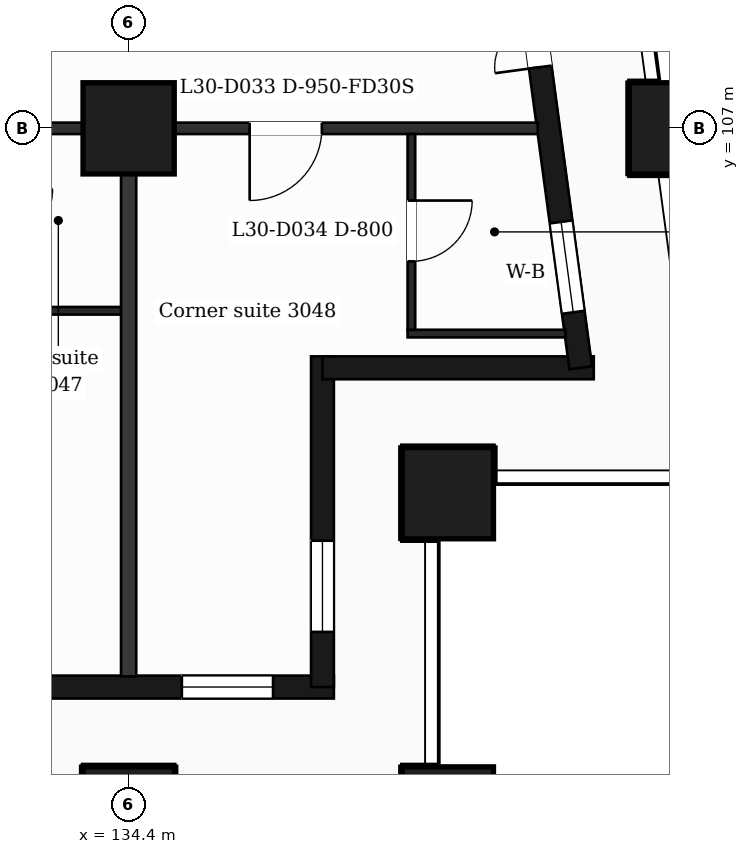
"""IFC4 building model, lengths in metres.
Left out: names, types, materials, properties, quantities, classifications, styles, units other than length and angle.
Written with IfcOpenShell. Run it as: python <this file> out.ifc"""

import sys

from ifc_helpers import new_model, si_unit, direction, frame, frame_2d, origin, origin_2d, place, context, subcontext, project, spatial, rectangle, extrude, element, fill, save


model = new_model("IFC4")
c1 = context("Model", 3, precision=1e-05, world=origin(), true_north=direction((0.0, 1.0)))
c2 = subcontext(c1, "Body", "Model", "MODEL_VIEW")
j1 = project(units=[si_unit("LENGTHUNIT", "METRE"), si_unit("PLANEANGLEUNIT", "RADIAN")], contexts=[c1])
p1 = place(None, origin())
s1 = spatial("IfcSite", under=j1, at=p1, CompositionType="ELEMENT")
p2 = place(p1, origin())
s2 = spatial("IfcBuilding", under=s1, at=p2, CompositionType="ELEMENT")
p3 = place(p2, frame((0.0, 0.0, 128.0)))
s3 = spatial("IfcBuildingStorey", under=s2, at=p3, CompositionType="ELEMENT", Elevation=128.0)
for number, where, z_axis, x_axis in (
    (1, (134.4, 98.0, 0.0), (0.0, 0.0, 1.0), (1.0, 0.0, 0.0)),
    (2, (138.6, 98.0, 0.0), (0.0, 0.0, 1.0), (1.0, 0.0, 0.0)),
    (3, (138.6, 102.2, 0.0), (0.0, 0.0, 1.0), (1.0, 0.0, 0.0)),
    (4, (134.4, 107.0, 0.0), (0.0, 0.0, 1.0), (1.0, 0.0, 0.0)),
    (5, (141.588, 107.0, 0.0), (0.0, 0.0, 1.0), (1.0, 0.0, 0.0)),
):
    element("IfcColumn", number, at=place(p3, frame(where, z_axis=z_axis, x_axis=x_axis)), inside=s3, PredefinedType="COLUMN", context=c2, shape_type="SweptSolid", body=[
        extrude(rectangle(XDim=1.2, YDim=1.2, at=origin_2d()), origin(), (0.0, 0.0, 1.0), 3.7),
    ])
p4 = place(p3, frame((89.85, 99.65, 0.0), z_axis=(0.0, 0.0, 1.0), x_axis=(1.0, 0.0, 0.0)))
e6 = element("IfcWall", 6, at=p4, inside=s3, PredefinedType="SOLIDWALL", context=c2, shape_type="SweptSolid", body=[
    extrude(rectangle(XDim=47.25, YDim=0.3, at=frame_2d((23.625, 0.0))), origin(), (0.0, 0.0, 1.0), 3.38),
])
p5 = place(p4, frame((0.725, 0.0, 0.9)))
e7 = element("IfcOpeningElement", 7, at=p5, cuts=e6, PredefinedType="OPENING", context=c2, shape_type="SweptSolid", body=[
    extrude(rectangle(XDim=1.2, YDim=2.1, at=frame_2d((0.6, 1.05))), frame((0.0, 0.16, 0.0), z_axis=(0.0, -1.0, 0.0), x_axis=(1.0, 0.0, 0.0)), (0.0, 0.0, 1.0), 0.32),
])
p6 = place(p4, frame((3.45, 0.0, 0.9)))
e8 = element("IfcOpeningElement", 8, at=p6, cuts=e6, PredefinedType="OPENING", context=c2, shape_type="SweptSolid", body=[
    extrude(rectangle(XDim=2.4, YDim=2.1, at=frame_2d((1.2, 1.05))), frame((0.0, 0.16, 0.0), z_axis=(0.0, -1.0, 0.0), x_axis=(1.0, 0.0, 0.0)), (0.0, 0.0, 1.0), 0.32),
])
p7 = place(p4, frame((8.25, 0.0, 0.9)))
e9 = element("IfcOpeningElement", 9, at=p7, cuts=e6, PredefinedType="OPENING", context=c2, shape_type="SweptSolid", body=[
    extrude(rectangle(XDim=1.2, YDim=2.1, at=frame_2d((0.6, 1.05))), frame((0.0, 0.16, 0.0), z_axis=(0.0, -1.0, 0.0), x_axis=(1.0, 0.0, 0.0)), (0.0, 0.0, 1.0), 0.32),
])
p8 = place(p4, frame((12.45, 0.0, 0.9)))
e10 = element("IfcOpeningElement", 10, at=p8, cuts=e6, PredefinedType="OPENING", context=c2, shape_type="SweptSolid", body=[
    extrude(rectangle(XDim=1.2, YDim=2.1, at=frame_2d((0.6, 1.05))), frame((0.0, 0.16, 0.0), z_axis=(0.0, -1.0, 0.0), x_axis=(1.0, 0.0, 0.0)), (0.0, 0.0, 1.0), 0.32),
])
p9 = place(p4, frame((16.05, 0.0, 0.9)))
e11 = element("IfcOpeningElement", 11, at=p9, cuts=e6, PredefinedType="OPENING", context=c2, shape_type="SweptSolid", body=[
    extrude(rectangle(XDim=2.4, YDim=2.1, at=frame_2d((1.2, 1.05))), frame((0.0, 0.16, 0.0), z_axis=(0.0, -1.0, 0.0), x_axis=(1.0, 0.0, 0.0)), (0.0, 0.0, 1.0), 0.32),
])
p10 = place(p4, frame((20.25, 0.0, 0.9)))
e12 = element("IfcOpeningElement", 12, at=p10, cuts=e6, PredefinedType="OPENING", context=c2, shape_type="SweptSolid", body=[
    extrude(rectangle(XDim=2.4, YDim=2.1, at=frame_2d((1.2, 1.05))), frame((0.0, 0.16, 0.0), z_axis=(0.0, -1.0, 0.0), x_axis=(1.0, 0.0, 0.0)), (0.0, 0.0, 1.0), 0.32),
])
p11 = place(p4, frame((25.05, 0.0, 0.0)))
e13 = element("IfcOpeningElement", 13, at=p11, cuts=e6, PredefinedType="OPENING", context=c2, shape_type="SweptSolid", body=[
    extrude(rectangle(XDim=1.2, YDim=2.4, at=frame_2d((0.6, 1.2))), frame((0.0, 0.16, 0.0), z_axis=(0.0, -1.0, 0.0), x_axis=(1.0, 0.0, 0.0)), (0.0, 0.0, 1.0), 0.32),
])
p12 = place(p4, frame((28.65, 0.0, 0.9)))
e14 = element("IfcOpeningElement", 14, at=p12, cuts=e6, PredefinedType="OPENING", context=c2, shape_type="SweptSolid", body=[
    extrude(rectangle(XDim=2.4, YDim=2.1, at=frame_2d((1.2, 1.05))), frame((0.0, 0.16, 0.0), z_axis=(0.0, -1.0, 0.0), x_axis=(1.0, 0.0, 0.0)), (0.0, 0.0, 1.0), 0.32),
])
p13 = place(p4, frame((32.85, 0.0, 0.9)))
e15 = element("IfcOpeningElement", 15, at=p13, cuts=e6, PredefinedType="OPENING", context=c2, shape_type="SweptSolid", body=[
    extrude(rectangle(XDim=2.4, YDim=2.1, at=frame_2d((1.2, 1.05))), frame((0.0, 0.16, 0.0), z_axis=(0.0, -1.0, 0.0), x_axis=(1.0, 0.0, 0.0)), (0.0, 0.0, 1.0), 0.32),
])
p14 = place(p4, frame((37.65, 0.0, 0.9)))
e16 = element("IfcOpeningElement", 16, at=p14, cuts=e6, PredefinedType="OPENING", context=c2, shape_type="SweptSolid", body=[
    extrude(rectangle(XDim=1.2, YDim=2.1, at=frame_2d((0.6, 1.05))), frame((0.0, 0.16, 0.0), z_axis=(0.0, -1.0, 0.0), x_axis=(1.0, 0.0, 0.0)), (0.0, 0.0, 1.0), 0.32),
])
p15 = place(p4, frame((41.85, 0.0, 0.9)))
e17 = element("IfcOpeningElement", 17, at=p15, cuts=e6, PredefinedType="OPENING", context=c2, shape_type="SweptSolid", body=[
    extrude(rectangle(XDim=1.2, YDim=2.1, at=frame_2d((0.6, 1.05))), frame((0.0, 0.16, 0.0), z_axis=(0.0, -1.0, 0.0), x_axis=(1.0, 0.0, 0.0)), (0.0, 0.0, 1.0), 0.32),
])
p16 = place(p4, frame((45.25, 0.0, 0.9)))
e18 = element("IfcOpeningElement", 18, at=p16, cuts=e6, PredefinedType="OPENING", context=c2, shape_type="SweptSolid", body=[
    extrude(rectangle(XDim=1.2, YDim=2.1, at=frame_2d((0.6, 1.05))), frame((0.0, 0.16, 0.0), z_axis=(0.0, -1.0, 0.0), x_axis=(1.0, 0.0, 0.0)), (0.0, 0.0, 1.0), 0.32),
])
p17 = place(p3, frame((136.95, 99.65, 0.0), z_axis=(0.0, 0.0, 1.0), x_axis=(0.0, 1.0, 0.0)))
e19 = element("IfcWall", 19, at=p17, inside=s3, PredefinedType="SOLIDWALL", context=c2, shape_type="SweptSolid", body=[
    extrude(rectangle(XDim=4.35, YDim=0.3, at=frame_2d((2.175, 0.0))), origin(), (0.0, 0.0, 1.0), 3.38),
])
p18 = place(p17, frame((0.725, 0.0, 0.9)))
e20 = element("IfcOpeningElement", 20, at=p18, cuts=e19, PredefinedType="OPENING", context=c2, shape_type="SweptSolid", body=[
    extrude(rectangle(XDim=1.2, YDim=2.1, at=frame_2d((0.6, 1.05))), frame((0.0, 0.16, 0.0), z_axis=(0.0, -1.0, 0.0), x_axis=(1.0, 0.0, 0.0)), (0.0, 0.0, 1.0), 0.32),
])
p19 = place(p3, frame((136.95, 103.85, 0.0), z_axis=(0.0, 0.0, 1.0), x_axis=(1.0, 0.0, 0.0)))
e21 = element("IfcWall", 21, at=p19, inside=s3, PredefinedType="SOLIDWALL", context=c2, shape_type="SweptSolid", body=[
    extrude(rectangle(XDim=3.569, YDim=0.3, at=frame_2d((1.785, 0.0))), origin(), (0.0, 0.0, 1.0), 3.38),
])
p20 = place(p3, frame((140.348, 103.85, 0.0), z_axis=(0.0, 0.0, 1.0), x_axis=(-0.133431549479, 0.991058031401, 0.0)))
e22 = element("IfcWall", 22, at=p20, inside=s3, PredefinedType="SOLIDWALL", context=c2, shape_type="SweptSolid", body=[
    extrude(rectangle(XDim=6.609, YDim=0.3, at=frame_2d((3.304, 0.0))), origin(), (0.0, 0.0, 1.0), 3.38),
])
p21 = place(p20, frame((0.737, 0.0, 0.9)))
e23 = element("IfcOpeningElement", 23, at=p21, cuts=e22, PredefinedType="OPENING", context=c2, shape_type="SweptSolid", body=[
    extrude(rectangle(XDim=1.2, YDim=2.1, at=frame_2d((0.6, 1.05))), frame((0.0, 0.16, 0.0), z_axis=(0.0, -1.0, 0.0), x_axis=(1.0, 0.0, 0.0)), (0.0, 0.0, 1.0), 0.32),
])
p22 = place(p20, frame((3.991, 0.0, 0.0)))
e24 = element("IfcOpeningElement", 24, at=p22, cuts=e22, PredefinedType="OPENING", context=c2, shape_type="SweptSolid", body=[
    extrude(rectangle(XDim=1.2, YDim=2.4, at=frame_2d((0.6, 1.2))), frame((0.0, 0.16, 0.0), z_axis=(0.0, -1.0, 0.0), x_axis=(1.0, 0.0, 0.0)), (0.0, 0.0, 1.0), 0.32),
])
p23 = place(p3, frame((138.07, 104.3, 0.0), z_axis=(0.0, 0.0, 1.0), x_axis=(1.0, 0.0, 0.0)))
e25 = element("IfcWall", 25, at=p23, inside=s3, PredefinedType="PARTITIONING", context=c2, shape_type="SweptSolid", body=[
    extrude(rectangle(XDim=2.076, YDim=0.1, at=frame_2d((1.038, 0.0))), origin(), (0.0, 0.0, 1.0), 3.38),
])
p24 = place(p3, frame((132.55, 104.6, 0.0), z_axis=(0.0, 0.0, 1.0), x_axis=(1.0, 0.0, 0.0)))
e26 = element("IfcWall", 26, at=p24, inside=s3, PredefinedType="PARTITIONING", context=c2, shape_type="SweptSolid", body=[
    extrude(rectangle(XDim=1.85, YDim=0.1, at=frame_2d((0.925, 0.0))), origin(), (0.0, 0.0, 1.0), 3.38),
])
p25 = place(p3, frame((87.018, 107.0, 0.0), z_axis=(0.0, 0.0, 1.0), x_axis=(1.0, 0.0, 0.0)))
e27 = element("IfcWall", 27, at=p25, inside=s3, PredefinedType="PARTITIONING", context=c2, shape_type="SweptSolid", body=[
    extrude(rectangle(XDim=52.765, YDim=0.15, at=frame_2d((26.382, 0.0))), origin(), (0.0, 0.0, 1.0), 3.38),
])
p26 = place(p25, frame((1.276, 0.0, 0.0)))
e28 = element("IfcOpeningElement", 28, at=p26, cuts=e27, PredefinedType="OPENING", context=c2, shape_type="SweptSolid", body=[
    extrude(rectangle(XDim=0.95, YDim=2.1, at=frame_2d((0.475, 1.05))), frame((0.0, 0.085, 0.0), z_axis=(0.0, -1.0, 0.0), x_axis=(1.0, 0.0, 0.0)), (0.0, 0.0, 1.0), 0.17),
])
p27 = place(p25, frame((7.645, 0.0, 0.0)))
e29 = element("IfcOpeningElement", 29, at=p27, cuts=e27, PredefinedType="OPENING", context=c2, shape_type="SweptSolid", body=[
    extrude(rectangle(XDim=0.95, YDim=2.1, at=frame_2d((0.475, 1.05))), frame((0.0, 0.085, 0.0), z_axis=(0.0, -1.0, 0.0), x_axis=(1.0, 0.0, 0.0)), (0.0, 0.0, 1.0), 0.17),
])
p28 = place(p25, frame((16.812, 0.0, 0.0)))
e30 = element("IfcOpeningElement", 30, at=p28, cuts=e27, PredefinedType="OPENING", context=c2, shape_type="SweptSolid", body=[
    extrude(rectangle(XDim=1.0, YDim=2.1, at=frame_2d((0.5, 1.05))), frame((0.0, 0.085, 0.0), z_axis=(0.0, -1.0, 0.0), x_axis=(1.0, 0.0, 0.0)), (0.0, 0.0, 1.0), 0.17),
])
p29 = place(p25, frame((22.952, 0.0, 0.0)))
e31 = element("IfcOpeningElement", 31, at=p29, cuts=e27, PredefinedType="OPENING", context=c2, shape_type="SweptSolid", body=[
    extrude(rectangle(XDim=0.95, YDim=2.1, at=frame_2d((0.475, 1.05))), frame((0.0, 0.085, 0.0), z_axis=(0.0, -1.0, 0.0), x_axis=(1.0, 0.0, 0.0)), (0.0, 0.0, 1.0), 0.17),
])
p30 = place(p25, frame((31.742, 0.0, 0.0)))
e32 = element("IfcOpeningElement", 32, at=p30, cuts=e27, PredefinedType="OPENING", context=c2, shape_type="SweptSolid", body=[
    extrude(rectangle(XDim=0.95, YDim=2.1, at=frame_2d((0.475, 1.05))), frame((0.0, 0.085, 0.0), z_axis=(0.0, -1.0, 0.0), x_axis=(1.0, 0.0, 0.0)), (0.0, 0.0, 1.0), 0.17),
])
p31 = place(p25, frame((35.169, 0.0, 0.0)))
e33 = element("IfcOpeningElement", 33, at=p31, cuts=e27, PredefinedType="OPENING", context=c2, shape_type="SweptSolid", body=[
    extrude(rectangle(XDim=0.95, YDim=2.1, at=frame_2d((0.475, 1.05))), frame((0.0, 0.085, 0.0), z_axis=(0.0, -1.0, 0.0), x_axis=(1.0, 0.0, 0.0)), (0.0, 0.0, 1.0), 0.17),
])
p32 = place(p25, frame((41.807, 0.0, 0.0)))
e34 = element("IfcOpeningElement", 34, at=p32, cuts=e27, PredefinedType="OPENING", context=c2, shape_type="SweptSolid", body=[
    extrude(rectangle(XDim=0.95, YDim=2.1, at=frame_2d((0.475, 1.05))), frame((0.0, 0.085, 0.0), z_axis=(0.0, -1.0, 0.0), x_axis=(1.0, 0.0, 0.0)), (0.0, 0.0, 1.0), 0.17),
])
p33 = place(p25, frame((43.832, 0.0, 0.0)))
e35 = element("IfcOpeningElement", 35, at=p33, cuts=e27, PredefinedType="OPENING", context=c2, shape_type="SweptSolid", body=[
    extrude(rectangle(XDim=0.95, YDim=2.1, at=frame_2d((0.475, 1.05))), frame((0.0, 0.085, 0.0), z_axis=(0.0, -1.0, 0.0), x_axis=(1.0, 0.0, 0.0)), (0.0, 0.0, 1.0), 0.17),
])
p34 = place(p25, frame((48.974, 0.0, 0.0)))
e36 = element("IfcOpeningElement", 36, at=p34, cuts=e27, PredefinedType="OPENING", context=c2, shape_type="SweptSolid", body=[
    extrude(rectangle(XDim=0.95, YDim=2.1, at=frame_2d((0.475, 1.05))), frame((0.0, 0.085, 0.0), z_axis=(0.0, -1.0, 0.0), x_axis=(1.0, 0.0, 0.0)), (0.0, 0.0, 1.0), 0.17),
])
p35 = place(p3, frame((134.4, 99.79, 0.0), z_axis=(0.0, 0.0, 1.0), x_axis=(0.0, 1.0, 0.0)))
e37 = element("IfcWall", 37, at=p35, inside=s3, PredefinedType="PARTITIONING", context=c2, shape_type="SweptSolid", body=[
    extrude(rectangle(XDim=7.135, YDim=0.2, at=frame_2d((3.567, 0.0))), origin(), (0.0, 0.0, 1.0), 3.38),
])
p36 = place(p3, frame((138.12, 104.35, 0.0), z_axis=(0.0, 0.0, 1.0), x_axis=(0.0, 1.0, 0.0)))
e38 = element("IfcWall", 38, at=p36, inside=s3, PredefinedType="PARTITIONING", context=c2, shape_type="SweptSolid", body=[
    extrude(rectangle(XDim=2.575, YDim=0.1, at=frame_2d((1.288, 0.0))), origin(), (0.0, 0.0, 1.0), 3.38),
])
p37 = place(p36, frame((0.9, 0.0, 0.0)))
e39 = element("IfcOpeningElement", 39, at=p37, cuts=e38, PredefinedType="OPENING", context=c2, shape_type="SweptSolid", body=[
    extrude(rectangle(XDim=0.8, YDim=2.1, at=frame_2d((0.4, 1.05))), frame((0.0, 0.06, 0.0), z_axis=(0.0, -1.0, 0.0), x_axis=(1.0, 0.0, 0.0)), (0.0, 0.0, 1.0), 0.12),
])
p38 = place(p16, origin())
e40 = element("IfcWindow", 40, at=p38, inside=s3, PartitioningType="SINGLE_PANEL", PredefinedType="WINDOW", context=c2, shape_type="SweptSolid", body=[
    extrude(rectangle(XDim=1.2, YDim=2.1, at=frame_2d((0.6, 1.05))), frame((0.0, 0.03, 0.0), z_axis=(0.0, -1.0, 0.0), x_axis=(1.0, 0.0, 0.0)), (0.0, 0.0, 1.0), 0.06),
])
fill(e18, e40)
p39 = place(p18, origin())
e41 = element("IfcWindow", 41, at=p39, inside=s3, PartitioningType="SINGLE_PANEL", PredefinedType="WINDOW", context=c2, shape_type="SweptSolid", body=[
    extrude(rectangle(XDim=1.2, YDim=2.1, at=frame_2d((0.6, 1.05))), frame((0.0, 0.03, 0.0), z_axis=(0.0, -1.0, 0.0), x_axis=(1.0, 0.0, 0.0)), (0.0, 0.0, 1.0), 0.06),
])
fill(e20, e41)
p40 = place(p21, origin())
e42 = element("IfcWindow", 42, at=p40, inside=s3, PartitioningType="SINGLE_PANEL", PredefinedType="WINDOW", context=c2, shape_type="SweptSolid", body=[
    extrude(rectangle(XDim=1.2, YDim=2.1, at=frame_2d((0.6, 1.05))), frame((0.0, 0.03, 0.0), z_axis=(0.0, -1.0, 0.0), x_axis=(1.0, 0.0, 0.0)), (0.0, 0.0, 1.0), 0.06),
])
fill(e23, e42)
p41 = place(p22, origin())
e43 = element("IfcDoor", 43, at=p41, inside=s3, OperationType="DOUBLE_DOOR_SINGLE_SWING", PredefinedType="DOOR", context=c2, shape_type="SweptSolid", body=[
    extrude(rectangle(XDim=1.2, YDim=2.4, at=frame_2d((0.6, 1.2))), frame((0.0, 0.025, 0.0), z_axis=(0.0, -1.0, 0.0), x_axis=(1.0, 0.0, 0.0)), (0.0, 0.0, 1.0), 0.05),
])
fill(e24, e43)
p42 = place(p34, origin())
e44 = element("IfcDoor", 44, at=p42, inside=s3, OperationType="SINGLE_SWING_LEFT", PredefinedType="DOOR", context=c2, shape_type="SweptSolid", body=[
    extrude(rectangle(XDim=0.95, YDim=2.1, at=frame_2d((0.475, 1.05))), frame((0.0, 0.025, 0.0), z_axis=(0.0, -1.0, 0.0), x_axis=(1.0, 0.0, 0.0)), (0.0, 0.0, 1.0), 0.05),
])
fill(e36, e44)
p43 = place(p37, origin())
e45 = element("IfcDoor", 45, at=p43, inside=s3, OperationType="SINGLE_SWING_RIGHT", PredefinedType="DOOR", context=c2, shape_type="SweptSolid", body=[
    extrude(rectangle(XDim=0.8, YDim=2.1, at=frame_2d((0.4, 1.05))), frame((0.0, 0.025, 0.0), z_axis=(0.0, -1.0, 0.0), x_axis=(1.0, 0.0, 0.0)), (0.0, 0.0, 1.0), 0.05),
])
fill(e39, e45)
save(model, sys.argv[1])
